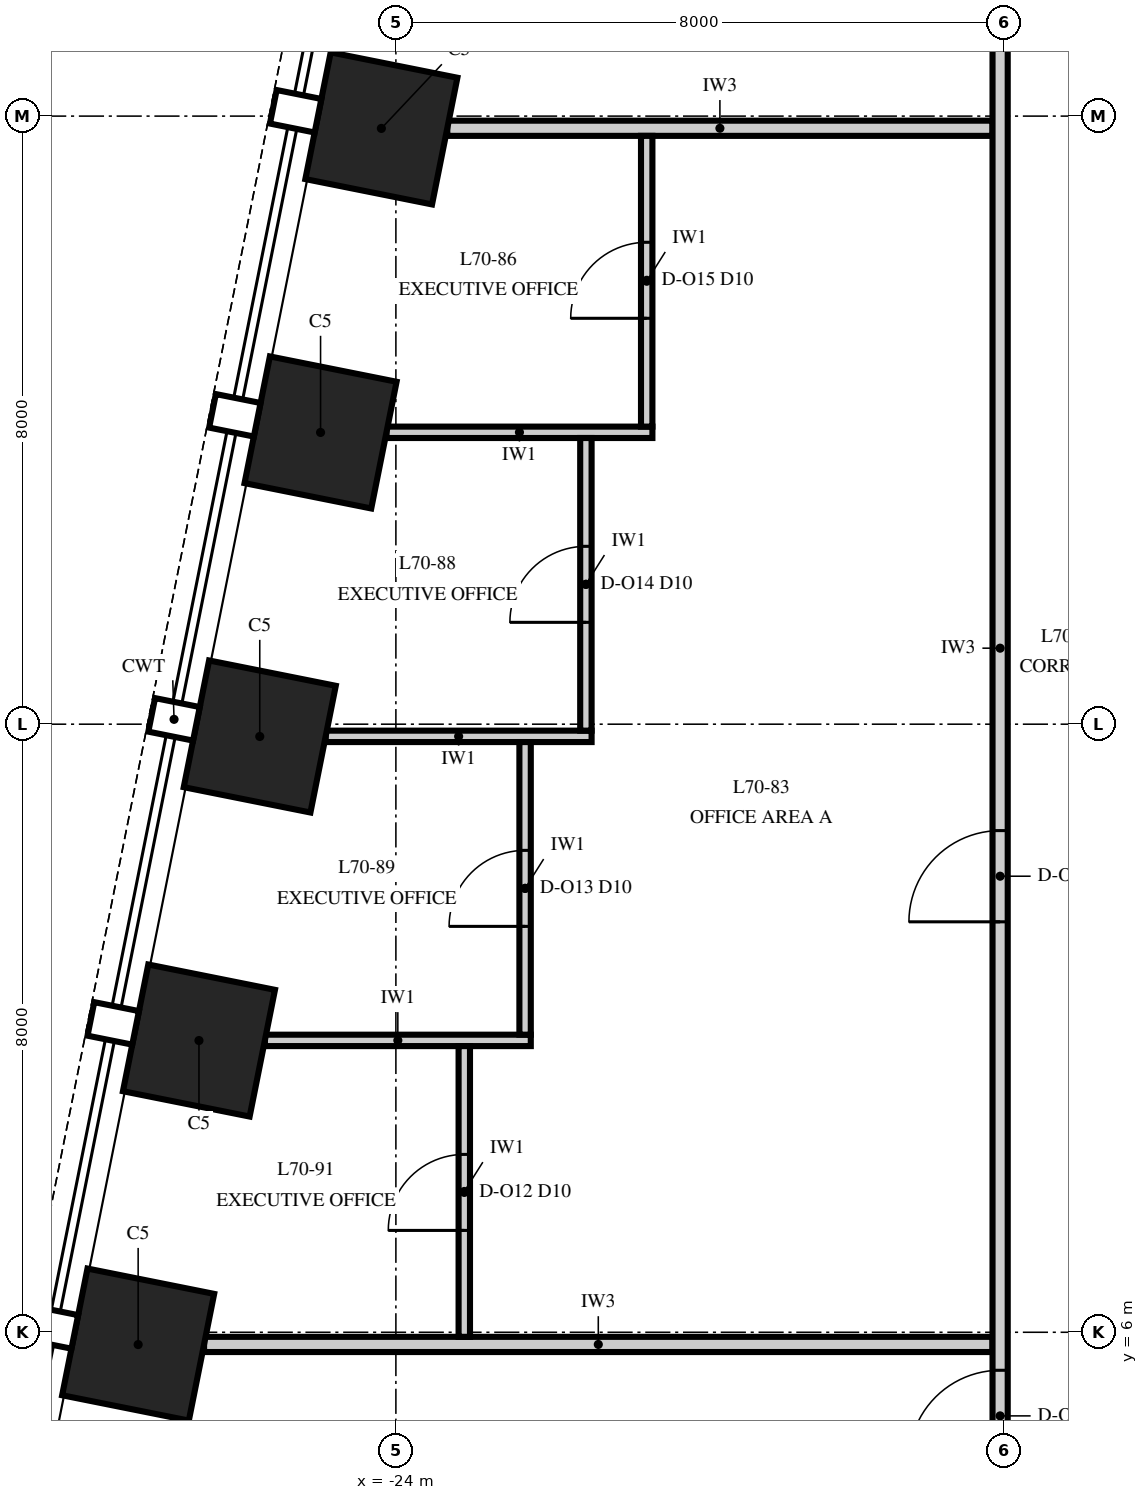
"""IFC4 building model, lengths in metres.
Left out: names, types, materials, properties, quantities, classifications, styles, units other than length and angle.
Written with IfcOpenShell. Run it as: python <this file> out.ifc"""

import sys

from ifc_helpers import new_model, si_unit, direction, frame, frame_2d, origin, origin_2d, place, context, subcontext, project, spatial, rectangle, extrude, element, fill, save


model = new_model("IFC4")
c1 = context("Model", 3, precision=1e-05, world=origin(), true_north=direction((0.0, 1.0)))
c2 = subcontext(c1, "Body", "Model", "MODEL_VIEW")
j1 = project(units=[si_unit("LENGTHUNIT", "METRE"), si_unit("PLANEANGLEUNIT", "RADIAN")], contexts=[c1])
p1 = place(None, origin())
s1 = spatial("IfcSite", under=j1, at=p1, CompositionType="ELEMENT")
p2 = place(p1, origin())
s2 = spatial("IfcBuilding", under=s1, at=p2, CompositionType="ELEMENT")
p3 = place(p2, frame((0.0, 0.0, 300.0)))
s3 = spatial("IfcBuildingStorey", under=s2, at=p3, CompositionType="ELEMENT", Elevation=300.0)
for number, where, z_axis, x_axis in (
    (1, (-24.191, 21.838, 0.0), (0.0, 0.0, 1.0), (-0.196, -0.981, 0.0)),
    (2, (-24.991, 17.838, 0.0), (0.0, 0.0, 1.0), (-0.196, -0.981, 0.0)),
    (3, (-25.791, 13.838, 0.0), (0.0, 0.0, 1.0), (-0.196, -0.981, 0.0)),
    (4, (-26.591, 9.838, 0.0), (0.0, 0.0, 1.0), (-0.196, -0.981, 0.0)),
    (5, (-27.391, 5.838, 0.0), (0.0, 0.0, 1.0), (-0.196, -0.981, 0.0)),
):
    element("IfcColumn", number, at=place(p3, frame(where, z_axis=z_axis, x_axis=x_axis)), inside=s3, PredefinedType="COLUMN", context=c2, shape_type="SweptSolid", body=[
        extrude(rectangle(XDim=1.7, YDim=1.7, at=origin_2d()), origin(), (0.0, 0.0, 1.0), 4.0),
    ])
p4 = place(p3, frame((-26.524, 5.84, 0.0), z_axis=(0.0, 0.0, 1.0), x_axis=(1.0, 0.0, 0.0)))
e6 = element("IfcWall", 6, at=p4, inside=s3, PredefinedType="PARTITIONING", context=c2, shape_type="SweptSolid", body=[
    extrude(rectangle(XDim=10.374, YDim=0.2, at=frame_2d((5.187, 0.0))), origin(), (0.0, 0.0, 1.0), 2.842),
])
for number, where, z_axis, x_axis in (
    (7, (-25.724, 9.84, 0.0), (0.0, 0.0, 1.0), (1.0, 0.0, 0.0)),
    (8, (-24.924, 13.84, 0.0), (0.0, 0.0, 1.0), (1.0, 0.0, 0.0)),
    (9, (-24.124, 17.84, 0.0), (0.0, 0.0, 1.0), (1.0, 0.0, 0.0)),
):
    element("IfcWall", number, at=place(p3, frame(where, z_axis=z_axis, x_axis=x_axis)), inside=s3, PredefinedType="PARTITIONING", context=c2, shape_type="SweptSolid", body=[
        extrude(rectangle(XDim=3.499, YDim=0.15, at=frame_2d((1.75, 0.0))), origin(), (0.0, 0.0, 1.0), 3.23),
    ])
p5 = place(p3, frame((-23.324, 21.84, 0.0), z_axis=(0.0, 0.0, 1.0), x_axis=(1.0, 0.0, 0.0)))
e10 = element("IfcWall", 10, at=p5, inside=s3, PredefinedType="PARTITIONING", context=c2, shape_type="SweptSolid", body=[
    extrude(rectangle(XDim=7.174, YDim=0.2, at=frame_2d((3.587, 0.0))), origin(), (0.0, 0.0, 1.0), 3.23),
])
p6 = place(p3, frame((-23.1, 5.94, 0.0), z_axis=(0.0, 0.0, 1.0), x_axis=(0.0, 1.0, 0.0)))
e11 = element("IfcWall", 11, at=p6, inside=s3, PredefinedType="PARTITIONING", context=c2, shape_type="SweptSolid", body=[
    extrude(rectangle(XDim=3.825, YDim=0.15, at=frame_2d((1.913, 0.0))), origin(), (0.0, 0.0, 1.0), 2.842),
])
p7 = place(p6, frame((1.4, 0.0, 0.0)))
e12 = element("IfcOpeningElement", 12, at=p7, cuts=e11, PredefinedType="OPENING", context=c2, shape_type="SweptSolid", body=[
    extrude(rectangle(XDim=1.0, YDim=2.3, at=frame_2d((0.5, 1.15))), frame((0.0, 0.09, 0.0), z_axis=(0.0, -1.0, 0.0), x_axis=(1.0, 0.0, 0.0)), (0.0, 0.0, 1.0), 0.18),
])
p8 = place(p3, frame((-22.3, 9.915, 0.0), z_axis=(0.0, 0.0, 1.0), x_axis=(0.0, 1.0, 0.0)))
e13 = element("IfcWall", 13, at=p8, inside=s3, PredefinedType="PARTITIONING", context=c2, shape_type="SweptSolid", body=[
    extrude(rectangle(XDim=3.85, YDim=0.15, at=frame_2d((1.925, 0.0))), origin(), (0.0, 0.0, 1.0), 3.85),
])
p9 = place(p8, frame((1.425, 0.0, 0.0)))
e14 = element("IfcOpeningElement", 14, at=p9, cuts=e13, PredefinedType="OPENING", context=c2, shape_type="SweptSolid", body=[
    extrude(rectangle(XDim=1.0, YDim=2.3, at=frame_2d((0.5, 1.15))), frame((0.0, 0.09, 0.0), z_axis=(0.0, -1.0, 0.0), x_axis=(1.0, 0.0, 0.0)), (0.0, 0.0, 1.0), 0.18),
])
p10 = place(p3, frame((-21.5, 13.915, 0.0), z_axis=(0.0, 0.0, 1.0), x_axis=(0.0, 1.0, 0.0)))
e15 = element("IfcWall", 15, at=p10, inside=s3, PredefinedType="PARTITIONING", context=c2, shape_type="SweptSolid", body=[
    extrude(rectangle(XDim=3.85, YDim=0.15, at=frame_2d((1.925, 0.0))), origin(), (0.0, 0.0, 1.0), 3.23),
])
p11 = place(p10, frame((1.425, 0.0, 0.0)))
e16 = element("IfcOpeningElement", 16, at=p11, cuts=e15, PredefinedType="OPENING", context=c2, shape_type="SweptSolid", body=[
    extrude(rectangle(XDim=1.0, YDim=2.3, at=frame_2d((0.5, 1.15))), frame((0.0, 0.09, 0.0), z_axis=(0.0, -1.0, 0.0), x_axis=(1.0, 0.0, 0.0)), (0.0, 0.0, 1.0), 0.18),
])
p12 = place(p3, frame((-20.7, 17.915, 0.0), z_axis=(0.0, 0.0, 1.0), x_axis=(0.0, 1.0, 0.0)))
e17 = element("IfcWall", 17, at=p12, inside=s3, PredefinedType="PARTITIONING", context=c2, shape_type="SweptSolid", body=[
    extrude(rectangle(XDim=3.825, YDim=0.15, at=frame_2d((1.913, 0.0))), origin(), (0.0, 0.0, 1.0), 3.23),
])
p13 = place(p12, frame((1.425, 0.0, 0.0)))
e18 = element("IfcOpeningElement", 18, at=p13, cuts=e17, PredefinedType="OPENING", context=c2, shape_type="SweptSolid", body=[
    extrude(rectangle(XDim=1.0, YDim=2.3, at=frame_2d((0.5, 1.15))), frame((0.0, 0.09, 0.0), z_axis=(0.0, -1.0, 0.0), x_axis=(1.0, 0.0, 0.0)), (0.0, 0.0, 1.0), 0.18),
])
p14 = place(p3, frame((-16.05, 4.05, 0.0), z_axis=(0.0, 0.0, 1.0), x_axis=(0.0, 1.0, 0.0)))
e19 = element("IfcWall", 19, at=p14, inside=s3, PredefinedType="PARTITIONING", context=c2, shape_type="SweptSolid", body=[
    extrude(rectangle(XDim=21.9, YDim=0.2, at=frame_2d((10.95, 0.0))), origin(), (0.0, 0.0, 1.0), 2.842),
])
p15 = place(p14, frame((0.25, 0.0, 0.0)))
e20 = element("IfcOpeningElement", 20, at=p15, cuts=e19, PredefinedType="OPENING", context=c2, shape_type="SweptSolid", body=[
    extrude(rectangle(XDim=1.2, YDim=2.4, at=frame_2d((0.6, 1.2))), frame((0.0, 0.115, 0.0), z_axis=(0.0, -1.0, 0.0), x_axis=(1.0, 0.0, 0.0)), (0.0, 0.0, 1.0), 0.23),
])
p16 = place(p14, frame((7.35, 0.0, 0.0)))
e21 = element("IfcOpeningElement", 21, at=p16, cuts=e19, PredefinedType="OPENING", context=c2, shape_type="SweptSolid", body=[
    extrude(rectangle(XDim=1.2, YDim=2.4, at=frame_2d((0.6, 1.2))), frame((0.0, 0.115, 0.0), z_axis=(0.0, -1.0, 0.0), x_axis=(1.0, 0.0, 0.0)), (0.0, 0.0, 1.0), 0.23),
])
p17 = place(p14, frame((20.35, 0.0, 0.0)))
e22 = element("IfcOpeningElement", 22, at=p17, cuts=e19, PredefinedType="OPENING", context=c2, shape_type="SweptSolid", body=[
    extrude(rectangle(XDim=1.2, YDim=2.4, at=frame_2d((0.6, 1.2))), frame((0.0, 0.115, 0.0), z_axis=(0.0, -1.0, 0.0), x_axis=(1.0, 0.0, 0.0)), (0.0, 0.0, 1.0), 0.23),
])
p18 = place(p7, origin())
e23 = element("IfcDoor", 23, at=p18, inside=s3, OperationType="SINGLE_SWING_LEFT", PredefinedType="DOOR", context=c2, shape_type="SweptSolid", body=[
    extrude(rectangle(XDim=1.0, YDim=2.3, at=frame_2d((0.5, 1.15))), frame((0.0, 0.075, 0.0), z_axis=(0.0, -1.0, 0.0), x_axis=(1.0, 0.0, 0.0)), (0.0, 0.0, 1.0), 0.149),
])
fill(e12, e23)
p19 = place(p9, origin())
e24 = element("IfcDoor", 24, at=p19, inside=s3, OperationType="SINGLE_SWING_LEFT", PredefinedType="DOOR", context=c2, shape_type="SweptSolid", body=[
    extrude(rectangle(XDim=1.0, YDim=2.3, at=frame_2d((0.5, 1.15))), frame((0.0, 0.075, 0.0), z_axis=(0.0, -1.0, 0.0), x_axis=(1.0, 0.0, 0.0)), (0.0, 0.0, 1.0), 0.149),
])
fill(e14, e24)
p20 = place(p11, origin())
e25 = element("IfcDoor", 25, at=p20, inside=s3, OperationType="SINGLE_SWING_LEFT", PredefinedType="DOOR", context=c2, shape_type="SweptSolid", body=[
    extrude(rectangle(XDim=1.0, YDim=2.3, at=frame_2d((0.5, 1.15))), frame((0.0, 0.075, 0.0), z_axis=(0.0, -1.0, 0.0), x_axis=(1.0, 0.0, 0.0)), (0.0, 0.0, 1.0), 0.149),
])
fill(e16, e25)
p21 = place(p13, origin())
e26 = element("IfcDoor", 26, at=p21, inside=s3, OperationType="SINGLE_SWING_LEFT", PredefinedType="DOOR", context=c2, shape_type="SweptSolid", body=[
    extrude(rectangle(XDim=1.0, YDim=2.3, at=frame_2d((0.5, 1.15))), frame((0.0, 0.075, 0.0), z_axis=(0.0, -1.0, 0.0), x_axis=(1.0, 0.0, 0.0)), (0.0, 0.0, 1.0), 0.149),
])
fill(e18, e26)
p22 = place(p15, origin())
e27 = element("IfcDoor", 27, at=p22, inside=s3, OperationType="SINGLE_SWING_LEFT", PredefinedType="DOOR", context=c2, shape_type="SweptSolid", body=[
    extrude(rectangle(XDim=1.2, YDim=2.4, at=frame_2d((0.6, 1.2))), frame((0.0, 0.1, 0.0), z_axis=(0.0, -1.0, 0.0), x_axis=(1.0, 0.0, 0.0)), (0.0, 0.0, 1.0), 0.199),
])
fill(e20, e27)
p23 = place(p16, origin())
e28 = element("IfcDoor", 28, at=p23, inside=s3, OperationType="SINGLE_SWING_LEFT", PredefinedType="DOOR", context=c2, shape_type="SweptSolid", body=[
    extrude(rectangle(XDim=1.2, YDim=2.4, at=frame_2d((0.6, 1.2))), frame((0.0, 0.1, 0.0), z_axis=(0.0, -1.0, 0.0), x_axis=(1.0, 0.0, 0.0)), (0.0, 0.0, 1.0), 0.199),
])
fill(e21, e28)
save(model, sys.argv[1])
